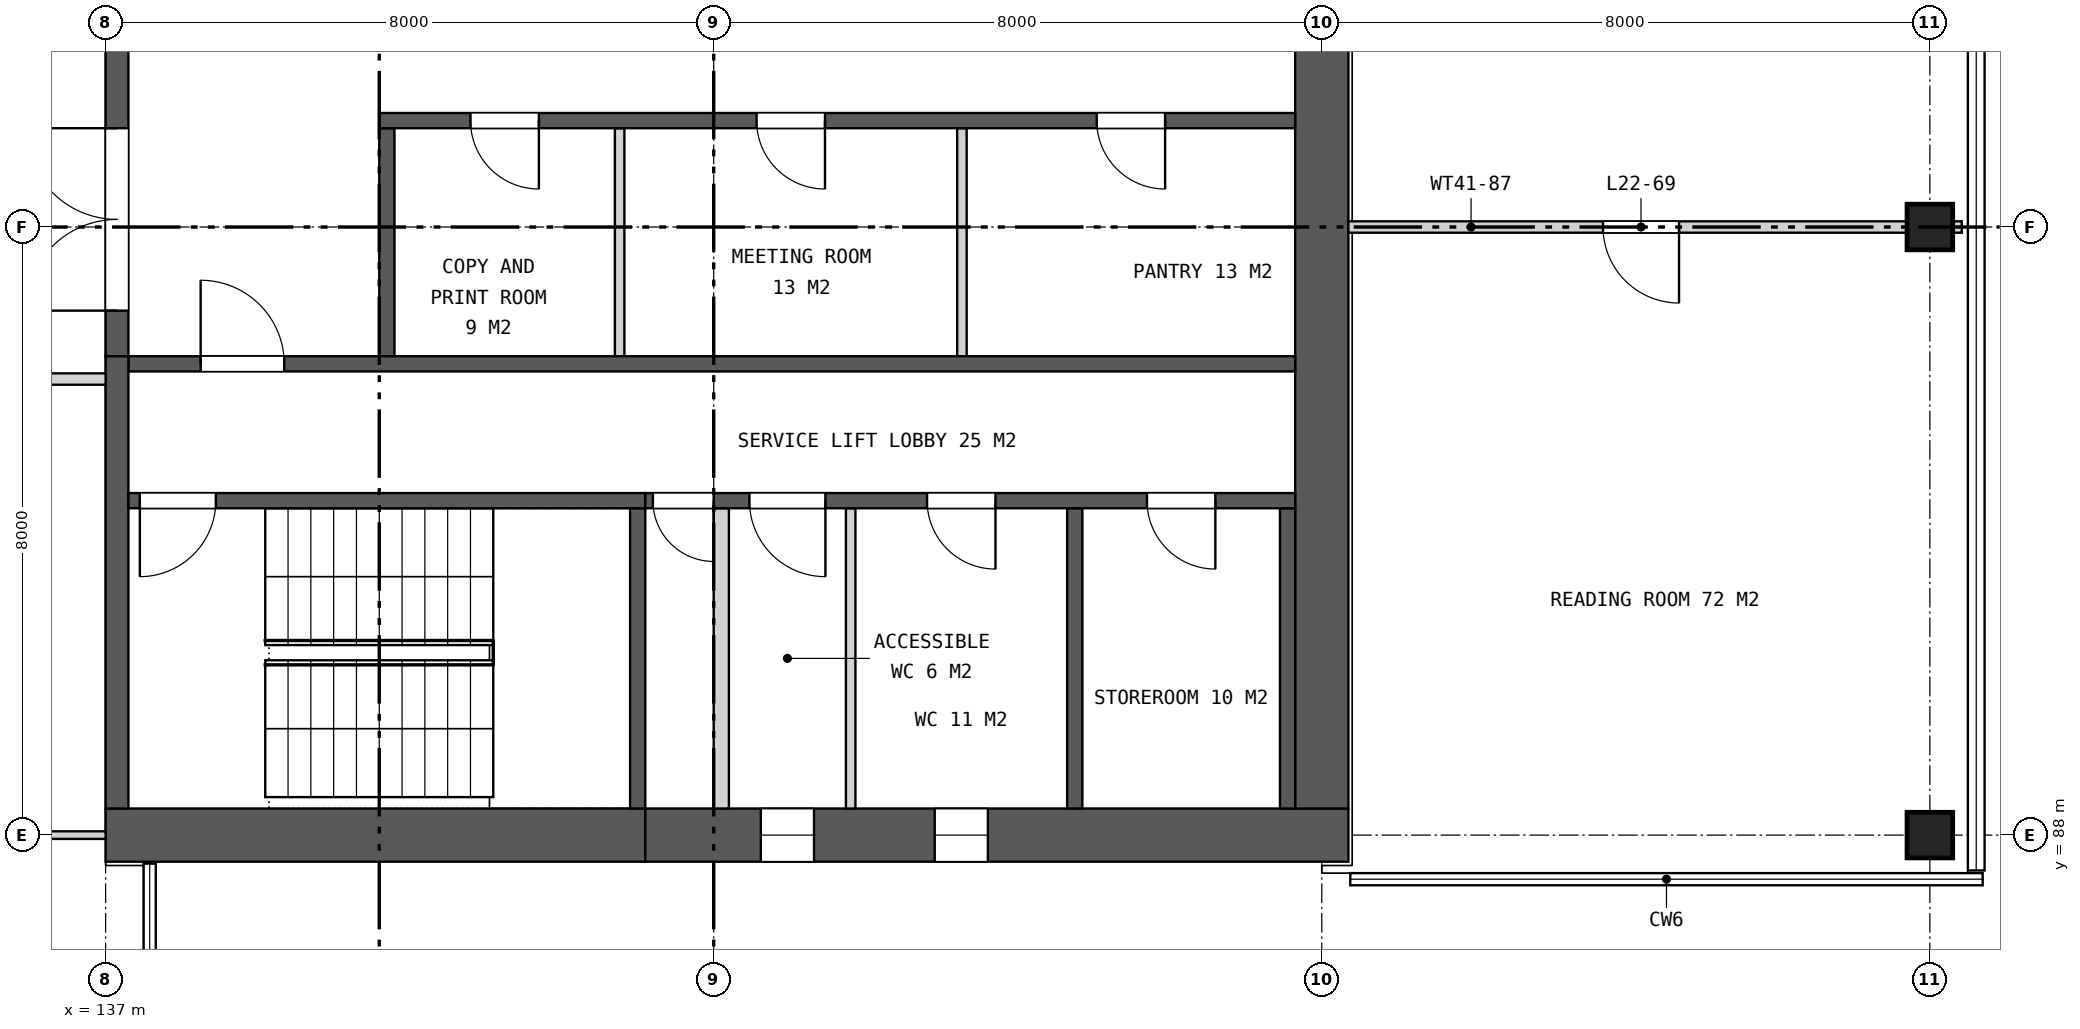
"""IFC4 building model, lengths in metres.
Left out: names, types, materials, properties, quantities, classifications, styles, units other than length and angle.
Written with IfcOpenShell. Run it as: python <this file> out.ifc"""

import sys

from ifc_helpers import new_model, si_unit, direction, frame, frame_2d, origin, origin_2d, place, context, subcontext, project, spatial, rectangle, extrude, element, fill, save


model = new_model("IFC4")
c1 = context("Model", 3, precision=1e-05, world=origin(), true_north=direction((0.0, 1.0)))
c2 = subcontext(c1, "Body", "Model", "MODEL_VIEW")
j1 = project(units=[si_unit("LENGTHUNIT", "METRE"), si_unit("PLANEANGLEUNIT", "RADIAN")], contexts=[c1])
p1 = place(None, origin())
s1 = spatial("IfcSite", under=j1, at=p1, CompositionType="ELEMENT")
p2 = place(p1, origin())
s2 = spatial("IfcBuilding", under=s1, at=p2, CompositionType="ELEMENT")
p3 = place(p2, frame((0.0, 0.0, 112.7)))
s3 = spatial("IfcBuildingStorey", under=s2, at=p3, CompositionType="ELEMENT", Elevation=112.7)
for number, where, z_axis, x_axis in (
    (1, (161.0, 88.0, 0.0), (0.0, 0.0, 1.0), (1.0, 0.0, 0.0)),
    (2, (161.0, 96.0, 0.0), (0.0, 0.0, 1.0), (1.0, 0.0, 0.0)),
):
    element("IfcColumn", number, at=place(p3, frame(where, z_axis=z_axis, x_axis=x_axis)), inside=s3, PredefinedType="COLUMN", context=c2, shape_type="SweptSolid", body=[
        extrude(rectangle(XDim=0.6, YDim=0.6, at=origin_2d()), origin(), (0.0, 0.0, 1.0), 4.2),
    ])
p4 = place(p3, frame((137.0, 88.0, 0.0), z_axis=(0.0, 0.0, 1.0), x_axis=(1.0, 0.0, 0.0)))
e3 = element("IfcWall", 3, at=p4, inside=s3, PredefinedType="SHEAR", context=c2, shape_type="SweptSolid", body=[
    extrude(rectangle(XDim=7.1, YDim=0.7, at=frame_2d((3.55, 0.0))), origin(), (0.0, 0.0, 1.0), 4.2),
])
p5 = place(p3, frame((144.1, 88.0, 0.0), z_axis=(0.0, 0.0, 1.0), x_axis=(1.0, 0.0, 0.0)))
e4 = element("IfcWall", 4, at=p5, inside=s3, PredefinedType="SHEAR", context=c2, shape_type="SweptSolid", body=[
    extrude(rectangle(XDim=9.25, YDim=0.7, at=frame_2d((4.625, 0.0))), origin(), (0.0, 0.0, 1.0), 4.2),
])
p6 = place(p5, frame((1.52, 0.0, 1.5)))
e5 = element("IfcOpeningElement", 5, at=p6, cuts=e4, PredefinedType="OPENING", context=c2, shape_type="SweptSolid", body=[
    extrude(rectangle(XDim=0.7, YDim=0.9, at=frame_2d((0.35, 0.45))), frame((0.0, 0.36, 0.0), z_axis=(0.0, -1.0, 0.0), x_axis=(1.0, 0.0, 0.0)), (0.0, 0.0, 1.0), 0.72),
])
p7 = place(p5, frame((3.807, 0.0, 1.5)))
e6 = element("IfcOpeningElement", 6, at=p7, cuts=e4, PredefinedType="OPENING", context=c2, shape_type="SweptSolid", body=[
    extrude(rectangle(XDim=0.7, YDim=0.9, at=frame_2d((0.35, 0.45))), frame((0.0, 0.36, 0.0), z_axis=(0.0, -1.0, 0.0), x_axis=(1.0, 0.0, 0.0)), (0.0, 0.0, 1.0), 0.72),
])
p8 = place(p3, frame((153.0, 88.35, 0.0), z_axis=(0.0, 0.0, 1.0), x_axis=(0.0, 1.0, 0.0)))
e7 = element("IfcWall", 7, at=p8, inside=s3, PredefinedType="SHEAR", context=c2, shape_type="SweptSolid", body=[
    extrude(rectangle(XDim=23.3, YDim=0.7, at=frame_2d((11.65, 0.0))), origin(), (0.0, 0.0, 1.0), 4.2),
])
p9 = place(p8, frame((10.45, 0.0, 0.0)))
e8 = element("IfcOpeningElement", 8, at=p9, cuts=e7, PredefinedType="OPENING", context=c2, shape_type="SweptSolid", body=[
    extrude(rectangle(XDim=2.4, YDim=2.4, at=frame_2d((1.2, 1.2))), frame((0.0, 0.36, 0.0), z_axis=(0.0, -1.0, 0.0), x_axis=(1.0, 0.0, 0.0)), (0.0, 0.0, 1.0), 0.72),
])
p10 = place(p3, frame((137.15, 94.3, 0.0), z_axis=(0.0, 0.0, 1.0), x_axis=(0.0, 1.0, 0.0)))
e9 = element("IfcWall", 9, at=p10, inside=s3, PredefinedType="SHEAR", context=c2, shape_type="SweptSolid", body=[
    extrude(rectangle(XDim=11.4, YDim=0.3, at=frame_2d((5.7, 0.0))), origin(), (0.0, 0.0, 1.0), 4.2),
])
p11 = place(p10, frame((0.6, 0.0, 0.0)))
e10 = element("IfcOpeningElement", 10, at=p11, cuts=e9, PredefinedType="OPENING", context=c2, shape_type="SweptSolid", body=[
    extrude(rectangle(XDim=2.4, YDim=2.4, at=frame_2d((1.2, 1.2))), frame((0.0, 0.16, 0.0), z_axis=(0.0, -1.0, 0.0), x_axis=(1.0, 0.0, 0.0)), (0.0, 0.0, 1.0), 0.32),
])
p12 = place(p10, frame((4.5, 0.0, 0.0)))
e11 = element("IfcOpeningElement", 11, at=p12, cuts=e9, PredefinedType="OPENING", context=c2, shape_type="SweptSolid", body=[
    extrude(rectangle(XDim=2.4, YDim=2.4, at=frame_2d((1.2, 1.2))), frame((0.0, 0.16, 0.0), z_axis=(0.0, -1.0, 0.0), x_axis=(1.0, 0.0, 0.0)), (0.0, 0.0, 1.0), 0.32),
])
p13 = place(p10, frame((8.4, 0.0, 0.0)))
e12 = element("IfcOpeningElement", 12, at=p13, cuts=e9, PredefinedType="OPENING", context=c2, shape_type="SweptSolid", body=[
    extrude(rectangle(XDim=2.4, YDim=2.4, at=frame_2d((1.2, 1.2))), frame((0.0, 0.16, 0.0), z_axis=(0.0, -1.0, 0.0), x_axis=(1.0, 0.0, 0.0)), (0.0, 0.0, 1.0), 0.32),
])
p14 = place(p3, frame((140.7, 94.3, 0.0), z_axis=(0.0, 0.0, 1.0), x_axis=(0.0, 1.0, 0.0)))
e13 = element("IfcWall", 13, at=p14, inside=s3, PredefinedType="SHEAR", context=c2, shape_type="SweptSolid", body=[
    extrude(rectangle(XDim=3.0, YDim=0.2, at=frame_2d((1.5, 0.0))), origin(), (0.0, 0.0, 1.0), 4.2),
])
for number, where, z_axis, x_axis in (
    (14, (143.762, 94.3, 0.0), (0.0, 0.0, 1.0), (0.0, 1.0, 0.0)),
    (15, (148.265, 94.3, 0.0), (0.0, 0.0, 1.0), (0.0, 1.0, 0.0)),
):
    element("IfcWall", number, at=place(p3, frame(where, z_axis=z_axis, x_axis=x_axis)), inside=s3, PredefinedType="PARTITIONING", context=c2, shape_type="SweptSolid", body=[
        extrude(rectangle(XDim=3.0, YDim=0.125, at=frame_2d((1.5, 0.0))), origin(), (0.0, 0.0, 1.0), 4.2),
    ])
p15 = place(p3, frame((140.6, 97.4, 0.0), z_axis=(0.0, 0.0, 1.0), x_axis=(1.0, 0.0, 0.0)))
e16 = element("IfcWall", 16, at=p15, inside=s3, PredefinedType="SHEAR", context=c2, shape_type="SweptSolid", body=[
    extrude(rectangle(XDim=12.05, YDim=0.2, at=frame_2d((6.025, 0.0))), origin(), (0.0, 0.0, 1.0), 4.2),
])
p16 = place(p15, frame((1.2, 0.0, 0.0)))
e17 = element("IfcOpeningElement", 17, at=p16, cuts=e16, PredefinedType="OPENING", context=c2, shape_type="SweptSolid", body=[
    extrude(rectangle(XDim=0.9, YDim=2.1, at=frame_2d((0.45, 1.05))), frame((0.0, 0.11, 0.0), z_axis=(0.0, -1.0, 0.0), x_axis=(1.0, 0.0, 0.0)), (0.0, 0.0, 1.0), 0.22),
])
p17 = place(p15, frame((4.964, 0.0, 0.0)))
e18 = element("IfcOpeningElement", 18, at=p17, cuts=e16, PredefinedType="OPENING", context=c2, shape_type="SweptSolid", body=[
    extrude(rectangle(XDim=0.9, YDim=2.1, at=frame_2d((0.45, 1.05))), frame((0.0, 0.11, 0.0), z_axis=(0.0, -1.0, 0.0), x_axis=(1.0, 0.0, 0.0)), (0.0, 0.0, 1.0), 0.22),
])
p18 = place(p15, frame((9.439, 0.0, 0.0)))
e19 = element("IfcOpeningElement", 19, at=p18, cuts=e16, PredefinedType="OPENING", context=c2, shape_type="SweptSolid", body=[
    extrude(rectangle(XDim=0.9, YDim=2.1, at=frame_2d((0.45, 1.05))), frame((0.0, 0.11, 0.0), z_axis=(0.0, -1.0, 0.0), x_axis=(1.0, 0.0, 0.0)), (0.0, 0.0, 1.0), 0.22),
])
p19 = place(p3, frame((137.3, 94.2, 0.0), z_axis=(0.0, 0.0, 1.0), x_axis=(1.0, 0.0, 0.0)))
e20 = element("IfcWall", 20, at=p19, inside=s3, PredefinedType="SHEAR", context=c2, shape_type="SweptSolid", body=[
    extrude(rectangle(XDim=15.35, YDim=0.2, at=frame_2d((7.675, 0.0))), origin(), (0.0, 0.0, 1.0), 4.2),
])
p20 = place(p19, frame((0.95, 0.0, 0.0)))
e21 = element("IfcOpeningElement", 21, at=p20, cuts=e20, PredefinedType="OPENING", context=c2, shape_type="SweptSolid", body=[
    extrude(rectangle(XDim=1.1, YDim=2.1, at=frame_2d((0.55, 1.05))), frame((0.0, 0.11, 0.0), z_axis=(0.0, -1.0, 0.0), x_axis=(1.0, 0.0, 0.0)), (0.0, 0.0, 1.0), 0.22),
])
p21 = place(p3, frame((137.15, 88.35, 0.0), z_axis=(0.0, 0.0, 1.0), x_axis=(0.0, 1.0, 0.0)))
e22 = element("IfcWall", 22, at=p21, inside=s3, PredefinedType="SHEAR", context=c2, shape_type="SweptSolid", body=[
    extrude(rectangle(XDim=5.95, YDim=0.3, at=frame_2d((2.975, 0.0))), origin(), (0.0, 0.0, 1.0), 4.2),
])
for number, where, z_axis, x_axis in (
    (23, (144.0, 88.35, 0.0), (0.0, 0.0, 1.0), (0.0, 1.0, 0.0)),
    (24, (149.75, 88.35, 0.0), (0.0, 0.0, 1.0), (0.0, 1.0, 0.0)),
    (25, (152.55, 88.35, 0.0), (0.0, 0.0, 1.0), (0.0, 1.0, 0.0)),
):
    element("IfcWall", number, at=place(p3, frame(where, z_axis=z_axis, x_axis=x_axis)), inside=s3, PredefinedType="SHEAR", context=c2, shape_type="SweptSolid", body=[
        extrude(rectangle(XDim=3.95, YDim=0.2, at=frame_2d((1.975, 0.0))), origin(), (0.0, 0.0, 1.0), 4.2),
    ])
p22 = place(p3, frame((145.1, 88.35, 0.0), z_axis=(0.0, 0.0, 1.0), x_axis=(0.0, 1.0, 0.0)))
e26 = element("IfcWall", 26, at=p22, inside=s3, PredefinedType="PARTITIONING", context=c2, shape_type="SweptSolid", body=[
    extrude(rectangle(XDim=3.95, YDim=0.2, at=frame_2d((1.975, 0.0))), origin(), (0.0, 0.0, 1.0), 4.2),
])
p23 = place(p3, frame((146.802, 88.35, 0.0), z_axis=(0.0, 0.0, 1.0), x_axis=(0.0, 1.0, 0.0)))
e27 = element("IfcWall", 27, at=p23, inside=s3, PredefinedType="PARTITIONING", context=c2, shape_type="SweptSolid", body=[
    extrude(rectangle(XDim=3.95, YDim=0.125, at=frame_2d((1.975, 0.0))), origin(), (0.0, 0.0, 1.0), 4.2),
])
p24 = place(p3, frame((137.3, 92.4, 0.0), z_axis=(0.0, 0.0, 1.0), x_axis=(1.0, 0.0, 0.0)))
e28 = element("IfcWall", 28, at=p24, inside=s3, PredefinedType="SHEAR", context=c2, shape_type="SweptSolid", body=[
    extrude(rectangle(XDim=6.8, YDim=0.2, at=frame_2d((3.4, 0.0))), origin(), (0.0, 0.0, 1.0), 4.2),
])
p25 = place(p24, frame((0.15, 0.0, 0.0)))
e29 = element("IfcOpeningElement", 29, at=p25, cuts=e28, PredefinedType="OPENING", context=c2, shape_type="SweptSolid", body=[
    extrude(rectangle(XDim=1.0, YDim=2.1, at=frame_2d((0.5, 1.05))), frame((0.0, 0.11, 0.0), z_axis=(0.0, -1.0, 0.0), x_axis=(1.0, 0.0, 0.0)), (0.0, 0.0, 1.0), 0.22),
])
p26 = place(p3, frame((144.1, 92.4, 0.0), z_axis=(0.0, 0.0, 1.0), x_axis=(1.0, 0.0, 0.0)))
e30 = element("IfcWall", 30, at=p26, inside=s3, PredefinedType="SHEAR", context=c2, shape_type="SweptSolid", body=[
    extrude(rectangle(XDim=8.55, YDim=0.2, at=frame_2d((4.275, 0.0))), origin(), (0.0, 0.0, 1.0), 4.2),
])
p27 = place(p26, frame((0.1, 0.0, 0.0)))
e31 = element("IfcOpeningElement", 31, at=p27, cuts=e30, PredefinedType="OPENING", context=c2, shape_type="SweptSolid", body=[
    extrude(rectangle(XDim=0.8, YDim=2.1, at=frame_2d((0.4, 1.05))), frame((0.0, 0.11, 0.0), z_axis=(0.0, -1.0, 0.0), x_axis=(1.0, 0.0, 0.0)), (0.0, 0.0, 1.0), 0.22),
])
p28 = place(p26, frame((1.37, 0.0, 0.0)))
e32 = element("IfcOpeningElement", 32, at=p28, cuts=e30, PredefinedType="OPENING", context=c2, shape_type="SweptSolid", body=[
    extrude(rectangle(XDim=1.0, YDim=2.1, at=frame_2d((0.5, 1.05))), frame((0.0, 0.11, 0.0), z_axis=(0.0, -1.0, 0.0), x_axis=(1.0, 0.0, 0.0)), (0.0, 0.0, 1.0), 0.22),
])
p29 = place(p26, frame((3.707, 0.0, 0.0)))
e33 = element("IfcOpeningElement", 33, at=p29, cuts=e30, PredefinedType="OPENING", context=c2, shape_type="SweptSolid", body=[
    extrude(rectangle(XDim=0.9, YDim=2.1, at=frame_2d((0.45, 1.05))), frame((0.0, 0.11, 0.0), z_axis=(0.0, -1.0, 0.0), x_axis=(1.0, 0.0, 0.0)), (0.0, 0.0, 1.0), 0.22),
])
p30 = place(p26, frame((6.6, 0.0, 0.0)))
e34 = element("IfcOpeningElement", 34, at=p30, cuts=e30, PredefinedType="OPENING", context=c2, shape_type="SweptSolid", body=[
    extrude(rectangle(XDim=0.9, YDim=2.1, at=frame_2d((0.45, 1.05))), frame((0.0, 0.11, 0.0), z_axis=(0.0, -1.0, 0.0), x_axis=(1.0, 0.0, 0.0)), (0.0, 0.0, 1.0), 0.22),
])
p31 = place(p3, frame((126.275, 88.0, 0.0), z_axis=(0.0, 0.0, 1.0), x_axis=(1.0, 0.0, 0.0)))
e35 = element("IfcWall", 35, at=p31, inside=s3, PredefinedType="PARTITIONING", context=c2, shape_type="SweptSolid", body=[
    extrude(rectangle(XDim=10.725, YDim=0.1, at=frame_2d((5.363, 0.0))), origin(), (0.0, 0.0, 1.0), 3.437),
])
p32 = place(p3, frame((126.275, 94.0, 0.0), z_axis=(0.0, 0.0, 1.0), x_axis=(1.0, 0.0, 0.0)))
e36 = element("IfcWall", 36, at=p32, inside=s3, PredefinedType="PARTITIONING", context=c2, shape_type="SweptSolid", body=[
    extrude(rectangle(XDim=10.725, YDim=0.15, at=frame_2d((5.363, 0.0))), origin(), (0.0, 0.0, 1.0), 3.437),
])
p33 = place(p3, frame((153.35, 96.0, 0.0), z_axis=(0.0, 0.0, 1.0), x_axis=(1.0, 0.0, 0.0)))
e37 = element("IfcWall", 37, at=p33, inside=s3, PredefinedType="PARTITIONING", context=c2, shape_type="SweptSolid", body=[
    extrude(rectangle(XDim=8.07, YDim=0.15, at=frame_2d((4.035, 0.0))), origin(), (0.0, 0.0, 1.0), 3.437),
])
p34 = place(p33, frame((3.35, 0.0, 0.0)))
e38 = element("IfcOpeningElement", 38, at=p34, cuts=e37, PredefinedType="OPENING", context=c2, shape_type="SweptSolid", body=[
    extrude(rectangle(XDim=1.0, YDim=2.1, at=frame_2d((0.5, 1.05))), frame((0.0, 0.085, 0.0), z_axis=(0.0, -1.0, 0.0), x_axis=(1.0, 0.0, 0.0)), (0.0, 0.0, 1.0), 0.17),
])
p35 = place(p6, origin())
e39 = element("IfcWindow", 39, at=p35, inside=s3, PartitioningType="SINGLE_PANEL", PredefinedType="WINDOW", context=c2, shape_type="SweptSolid", body=[
    extrude(rectangle(XDim=0.7, YDim=0.9, at=frame_2d((0.35, 0.45))), frame((0.0, 0.03, 0.0), z_axis=(0.0, -1.0, 0.0), x_axis=(1.0, 0.0, 0.0)), (0.0, 0.0, 1.0), 0.06),
])
fill(e5, e39)
p36 = place(p7, origin())
e40 = element("IfcWindow", 40, at=p36, inside=s3, PartitioningType="SINGLE_PANEL", PredefinedType="WINDOW", context=c2, shape_type="SweptSolid", body=[
    extrude(rectangle(XDim=0.7, YDim=0.9, at=frame_2d((0.35, 0.45))), frame((0.0, 0.03, 0.0), z_axis=(0.0, -1.0, 0.0), x_axis=(1.0, 0.0, 0.0)), (0.0, 0.0, 1.0), 0.06),
])
fill(e6, e40)
p37 = place(p11, origin())
e41 = element("IfcDoor", 41, at=p37, inside=s3, OperationType="DOUBLE_DOOR_SINGLE_SWING", PredefinedType="DOOR", context=c2, shape_type="SweptSolid", body=[
    extrude(rectangle(XDim=2.4, YDim=2.4, at=frame_2d((1.2, 1.2))), frame((0.0, 0.025, 0.0), z_axis=(0.0, -1.0, 0.0), x_axis=(1.0, 0.0, 0.0)), (0.0, 0.0, 1.0), 0.05),
])
fill(e10, e41)
p38 = place(p16, frame((0.9, 0.0, 0.0), z_axis=(0.0, 0.0, 1.0), x_axis=(-1.0, 0.0, 0.0)))
e42 = element("IfcDoor", 42, at=p38, inside=s3, OperationType="SINGLE_SWING_LEFT", PredefinedType="DOOR", context=c2, shape_type="SweptSolid", body=[
    extrude(rectangle(XDim=0.9, YDim=2.1, at=frame_2d((0.45, 1.05))), frame((0.0, 0.025, 0.0), z_axis=(0.0, -1.0, 0.0), x_axis=(1.0, 0.0, 0.0)), (0.0, 0.0, 1.0), 0.05),
])
fill(e17, e42)
p39 = place(p17, frame((0.9, 0.0, 0.0), z_axis=(0.0, 0.0, 1.0), x_axis=(-1.0, 0.0, 0.0)))
e43 = element("IfcDoor", 43, at=p39, inside=s3, OperationType="SINGLE_SWING_LEFT", PredefinedType="DOOR", context=c2, shape_type="SweptSolid", body=[
    extrude(rectangle(XDim=0.9, YDim=2.1, at=frame_2d((0.45, 1.05))), frame((0.0, 0.025, 0.0), z_axis=(0.0, -1.0, 0.0), x_axis=(1.0, 0.0, 0.0)), (0.0, 0.0, 1.0), 0.05),
])
fill(e18, e43)
p40 = place(p18, frame((0.9, 0.0, 0.0), z_axis=(0.0, 0.0, 1.0), x_axis=(-1.0, 0.0, 0.0)))
e44 = element("IfcDoor", 44, at=p40, inside=s3, OperationType="SINGLE_SWING_LEFT", PredefinedType="DOOR", context=c2, shape_type="SweptSolid", body=[
    extrude(rectangle(XDim=0.9, YDim=2.1, at=frame_2d((0.45, 1.05))), frame((0.0, 0.025, 0.0), z_axis=(0.0, -1.0, 0.0), x_axis=(1.0, 0.0, 0.0)), (0.0, 0.0, 1.0), 0.05),
])
fill(e19, e44)
p41 = place(p20, origin())
e45 = element("IfcDoor", 45, at=p41, inside=s3, OperationType="SINGLE_SWING_LEFT", PredefinedType="DOOR", context=c2, shape_type="SweptSolid", body=[
    extrude(rectangle(XDim=1.1, YDim=2.1, at=frame_2d((0.55, 1.05))), frame((0.0, 0.025, 0.0), z_axis=(0.0, -1.0, 0.0), x_axis=(1.0, 0.0, 0.0)), (0.0, 0.0, 1.0), 0.05),
])
fill(e21, e45)
p42 = place(p25, frame((1.0, 0.0, 0.0), z_axis=(0.0, 0.0, 1.0), x_axis=(-1.0, 0.0, 0.0)))
e46 = element("IfcDoor", 46, at=p42, inside=s3, OperationType="SINGLE_SWING_RIGHT", PredefinedType="DOOR", context=c2, shape_type="SweptSolid", body=[
    extrude(rectangle(XDim=1.0, YDim=2.1, at=frame_2d((0.5, 1.05))), frame((0.0, 0.025, 0.0), z_axis=(0.0, -1.0, 0.0), x_axis=(1.0, 0.0, 0.0)), (0.0, 0.0, 1.0), 0.05),
])
fill(e29, e46)
p43 = place(p27, frame((0.8, 0.0, 0.0), z_axis=(0.0, 0.0, 1.0), x_axis=(-1.0, 0.0, 0.0)))
e47 = element("IfcDoor", 47, at=p43, inside=s3, OperationType="SINGLE_SWING_LEFT", PredefinedType="DOOR", context=c2, shape_type="SweptSolid", body=[
    extrude(rectangle(XDim=0.8, YDim=2.1, at=frame_2d((0.4, 1.05))), frame((0.0, 0.025, 0.0), z_axis=(0.0, -1.0, 0.0), x_axis=(1.0, 0.0, 0.0)), (0.0, 0.0, 1.0), 0.05),
])
fill(e31, e47)
p44 = place(p28, frame((1.0, 0.0, 0.0), z_axis=(0.0, 0.0, 1.0), x_axis=(-1.0, 0.0, 0.0)))
e48 = element("IfcDoor", 48, at=p44, inside=s3, OperationType="SINGLE_SWING_LEFT", PredefinedType="DOOR", context=c2, shape_type="SweptSolid", body=[
    extrude(rectangle(XDim=1.0, YDim=2.1, at=frame_2d((0.5, 1.05))), frame((0.0, 0.025, 0.0), z_axis=(0.0, -1.0, 0.0), x_axis=(1.0, 0.0, 0.0)), (0.0, 0.0, 1.0), 0.05),
])
fill(e32, e48)
p45 = place(p29, frame((0.9, 0.0, 0.0), z_axis=(0.0, 0.0, 1.0), x_axis=(-1.0, 0.0, 0.0)))
e49 = element("IfcDoor", 49, at=p45, inside=s3, OperationType="SINGLE_SWING_LEFT", PredefinedType="DOOR", context=c2, shape_type="SweptSolid", body=[
    extrude(rectangle(XDim=0.9, YDim=2.1, at=frame_2d((0.45, 1.05))), frame((0.0, 0.025, 0.0), z_axis=(0.0, -1.0, 0.0), x_axis=(1.0, 0.0, 0.0)), (0.0, 0.0, 1.0), 0.05),
])
fill(e33, e49)
p46 = place(p30, frame((0.9, 0.0, 0.0), z_axis=(0.0, 0.0, 1.0), x_axis=(-1.0, 0.0, 0.0)))
e50 = element("IfcDoor", 50, at=p46, inside=s3, OperationType="SINGLE_SWING_LEFT", PredefinedType="DOOR", context=c2, shape_type="SweptSolid", body=[
    extrude(rectangle(XDim=0.9, YDim=2.1, at=frame_2d((0.45, 1.05))), frame((0.0, 0.025, 0.0), z_axis=(0.0, -1.0, 0.0), x_axis=(1.0, 0.0, 0.0)), (0.0, 0.0, 1.0), 0.05),
])
fill(e34, e50)
p47 = place(p34, frame((1.0, 0.0, 0.0), z_axis=(0.0, 0.0, 1.0), x_axis=(-1.0, 0.0, 0.0)))
e51 = element("IfcDoor", 51, at=p47, inside=s3, OperationType="SINGLE_SWING_LEFT", PredefinedType="DOOR", context=c2, shape_type="SweptSolid", body=[
    extrude(rectangle(XDim=1.0, YDim=2.1, at=frame_2d((0.5, 1.05))), frame((0.0, 0.025, 0.0), z_axis=(0.0, -1.0, 0.0), x_axis=(1.0, 0.0, 0.0)), (0.0, 0.0, 1.0), 0.05),
])
fill(e38, e51)
save(model, sys.argv[1])
